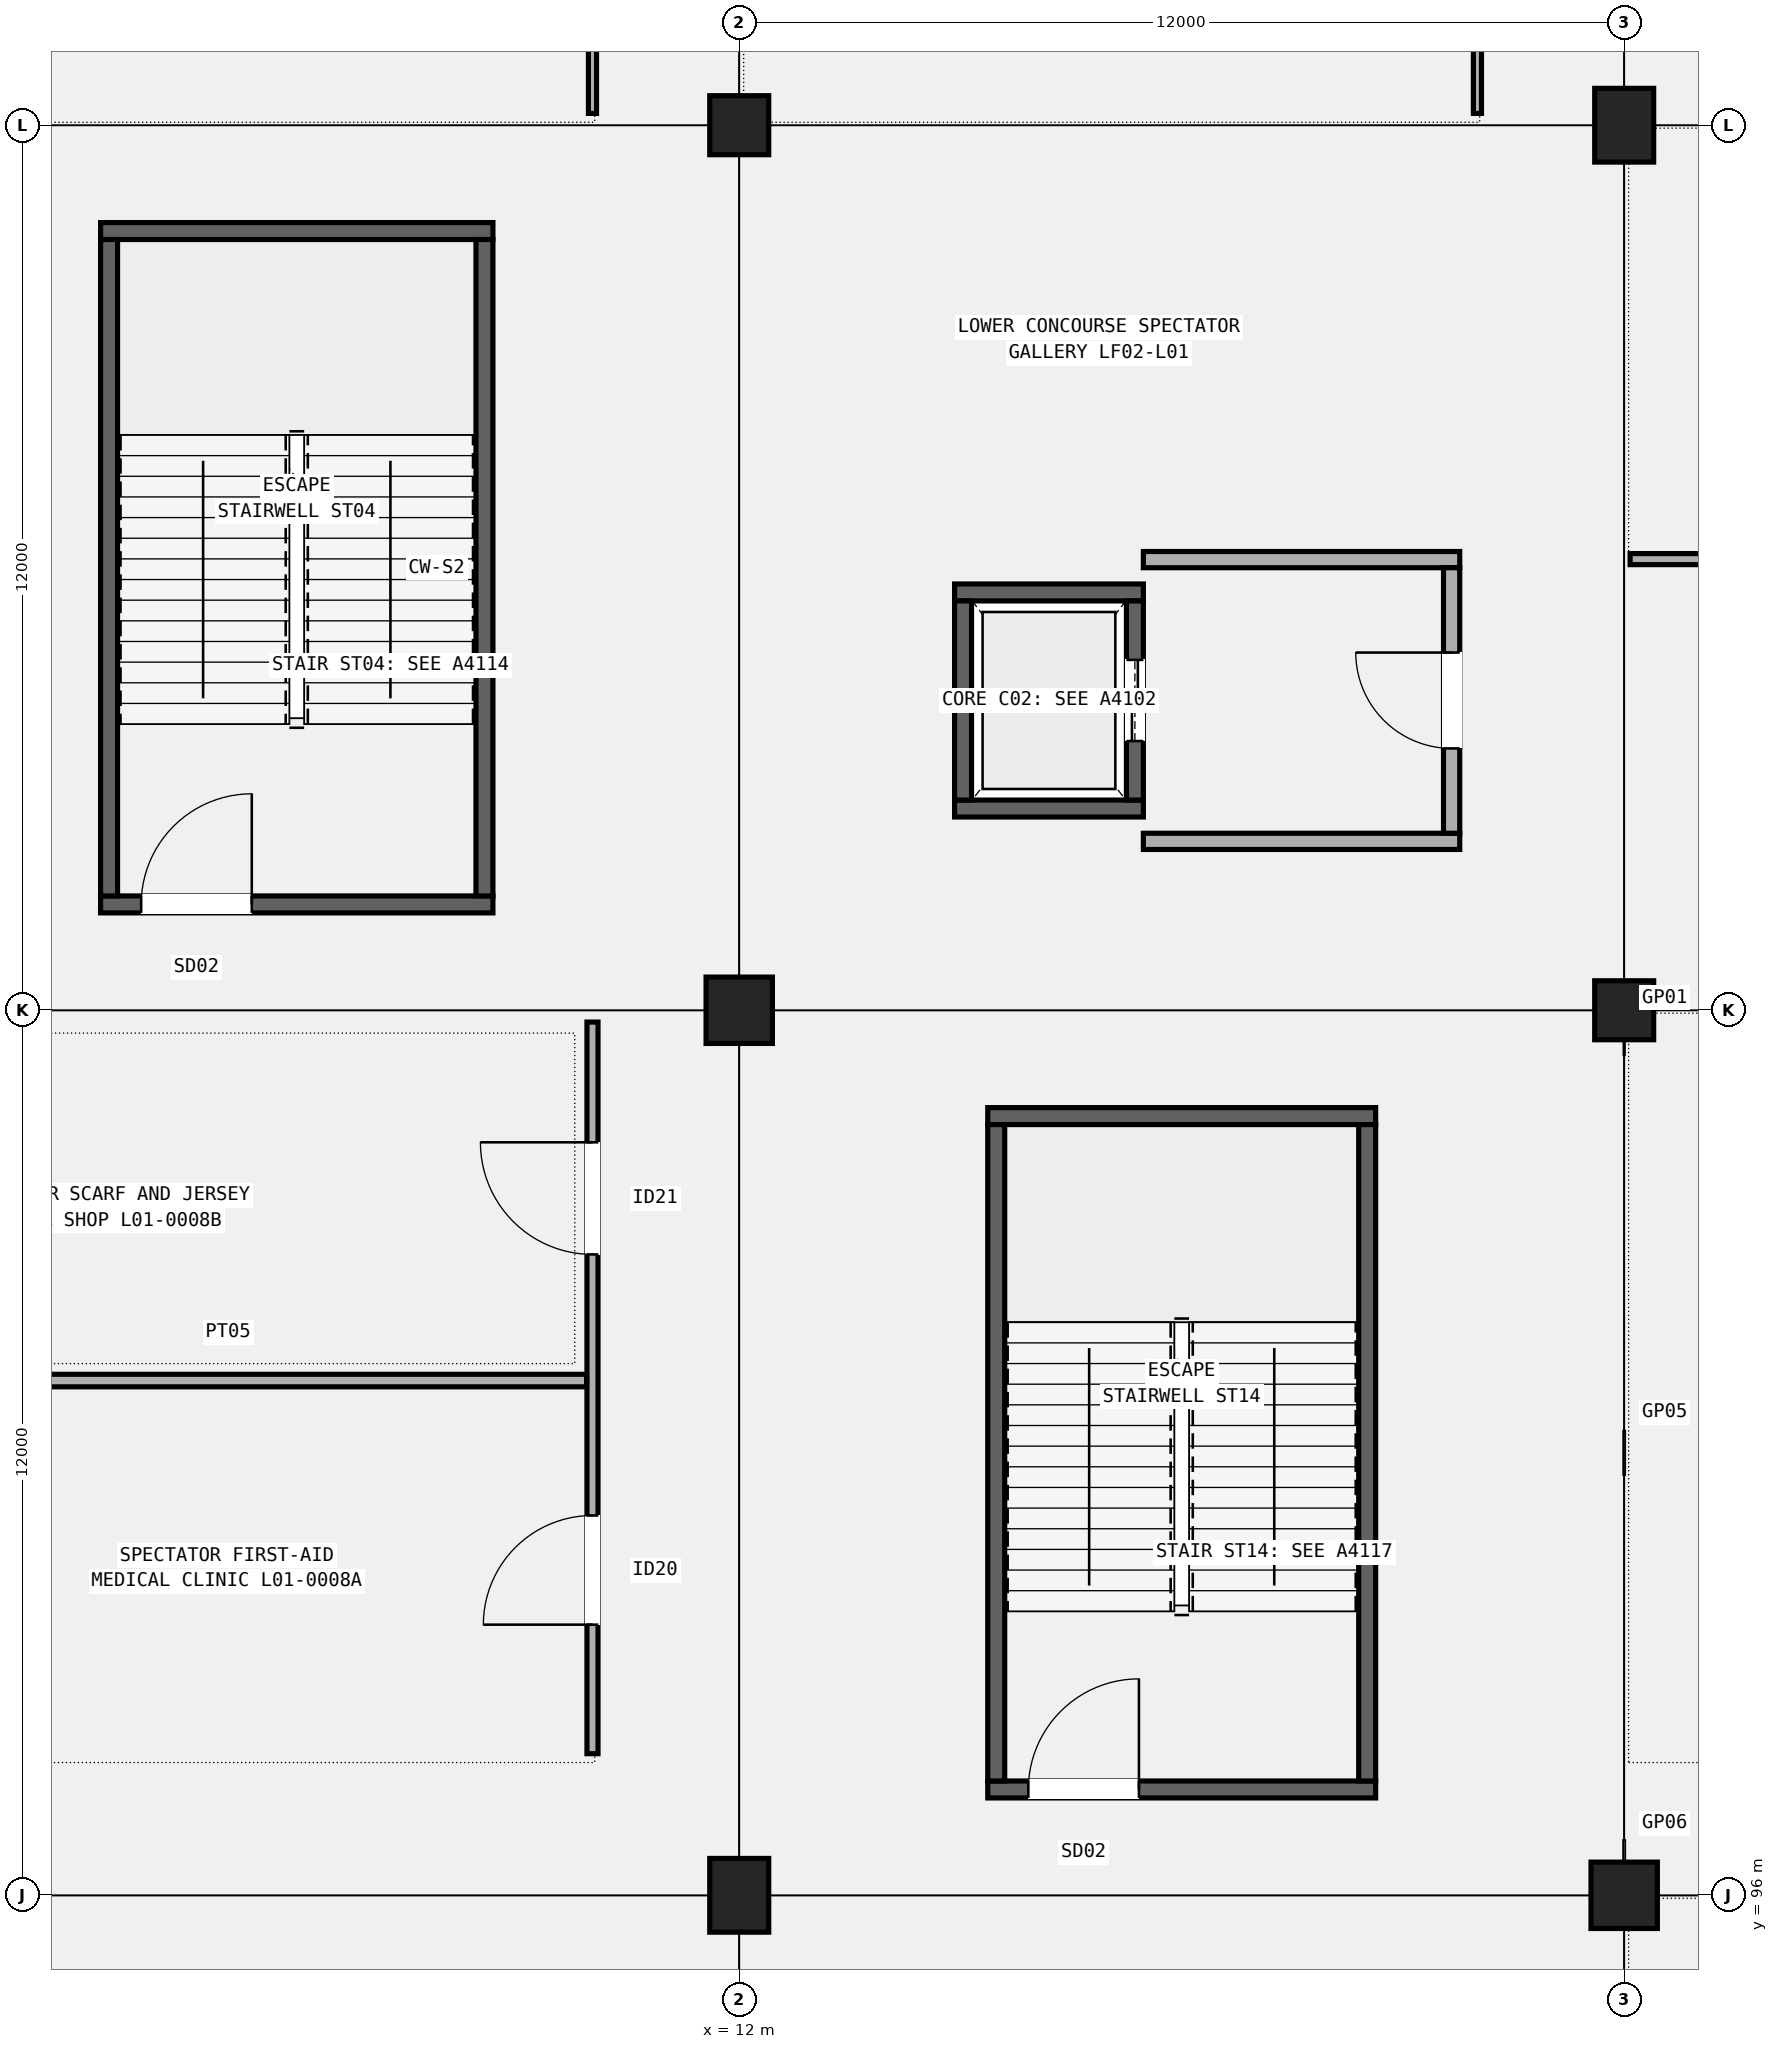
"""IFC4 building model, lengths in metres.
Left out: names, types, materials, properties, quantities, classifications, styles, units other than length and angle.
Written with IfcOpenShell. Run it as: python <this file> out.ifc"""

import sys

from ifc_helpers import new_model, si_unit, direction, frame, frame_2d, origin, origin_2d, place, context, subcontext, project, spatial, rectangle, extrude, element, fill, save


model = new_model("IFC4")
c1 = context("Model", 3, precision=1e-05, world=origin(), true_north=direction((0.0, 1.0)))
c2 = subcontext(c1, "Body", "Model", "MODEL_VIEW")
j1 = project(units=[si_unit("LENGTHUNIT", "METRE"), si_unit("PLANEANGLEUNIT", "RADIAN")], contexts=[c1])
p1 = place(None, origin())
s1 = spatial("IfcSite", under=j1, at=p1, CompositionType="ELEMENT")
p2 = place(p1, origin())
s2 = spatial("IfcBuilding", under=s1, at=p2, CompositionType="ELEMENT")
p3 = place(p2, frame((0.0, 0.0, 5.4)))
s3 = spatial("IfcBuildingStorey", under=s2, at=p3, CompositionType="ELEMENT", Elevation=5.4)
p4 = place(p3, frame((12.0, 96.0, 0.0), z_axis=(0.0, 0.0, 1.0), x_axis=(1.0, 0.0, 0.0)))
e1 = element("IfcColumn", 1, at=p4, inside=s3, PredefinedType="COLUMN", context=c2, shape_type="SweptSolid", body=[
    extrude(rectangle(XDim=0.8, YDim=1.0, at=origin_2d()), origin(), (0.0, 0.0, 1.0), 4.8),
])
p5 = place(p3, frame((12.0, 108.0, 0.0), z_axis=(0.0, 0.0, 1.0), x_axis=(1.0, 0.0, 0.0)))
e2 = element("IfcColumn", 2, at=p5, inside=s3, PredefinedType="COLUMN", context=c2, shape_type="SweptSolid", body=[
    extrude(rectangle(XDim=0.9, YDim=0.9, at=origin_2d()), origin(), (0.0, 0.0, 1.0), 4.8),
])
p6 = place(p3, frame((12.0, 120.0, 0.0), z_axis=(0.0, 0.0, 1.0), x_axis=(1.0, 0.0, 0.0)))
e3 = element("IfcColumn", 3, at=p6, inside=s3, PredefinedType="COLUMN", context=c2, shape_type="SweptSolid", body=[
    extrude(rectangle(XDim=0.8, YDim=0.8, at=origin_2d()), origin(), (0.0, 0.0, 1.0), 4.8),
])
p7 = place(p3, frame((24.0, 96.0, 0.0), z_axis=(0.0, 0.0, 1.0), x_axis=(1.0, 0.0, 0.0)))
e4 = element("IfcColumn", 4, at=p7, inside=s3, PredefinedType="COLUMN", context=c2, shape_type="SweptSolid", body=[
    extrude(rectangle(XDim=0.9, YDim=0.9, at=origin_2d()), origin(), (0.0, 0.0, 1.0), 4.8),
])
p8 = place(p3, frame((24.0, 108.0, 0.0), z_axis=(0.0, 0.0, 1.0), x_axis=(1.0, 0.0, 0.0)))
e5 = element("IfcColumn", 5, at=p8, inside=s3, PredefinedType="COLUMN", context=c2, shape_type="SweptSolid", body=[
    extrude(rectangle(XDim=0.8, YDim=0.8, at=origin_2d()), origin(), (0.0, 0.0, 1.0), 4.8),
])
p9 = place(p3, frame((24.0, 120.0, 0.0), z_axis=(0.0, 0.0, 1.0), x_axis=(1.0, 0.0, 0.0)))
e6 = element("IfcColumn", 6, at=p9, inside=s3, PredefinedType="COLUMN", context=c2, shape_type="SweptSolid", body=[
    extrude(rectangle(XDim=0.8, YDim=1.0, at=origin_2d()), origin(), (0.0, 0.0, 1.0), 4.8),
])
p10 = place(p3, frame((3.34, 109.435, 0.0), z_axis=(0.0, 0.0, 1.0), x_axis=(1.0, 0.0, 0.0)))
e7 = element("IfcWall", 7, at=p10, inside=s3, PredefinedType="SHEAR", context=c2, shape_type="SweptSolid", body=[
    extrude(rectangle(XDim=5.32, YDim=0.23, at=frame_2d((2.66, 0.0))), origin(), (0.0, 0.0, 1.0), 4.55),
])
p11 = place(p10, frame((0.55, 0.0, 0.0)))
e8 = element("IfcOpeningElement", 8, at=p11, cuts=e7, PredefinedType="OPENING", context=c2, shape_type="SweptSolid", body=[
    extrude(rectangle(XDim=1.5, YDim=2.2, at=frame_2d((0.75, 1.1))), frame((0.0, 0.125, 0.0), z_axis=(0.0, -1.0, 0.0), x_axis=(1.0, 0.0, 0.0)), (0.0, 0.0, 1.0), 0.25),
])
p12 = place(p3, frame((3.34, 118.565, 0.0), z_axis=(0.0, 0.0, 1.0), x_axis=(1.0, 0.0, 0.0)))
e9 = element("IfcWall", 9, at=p12, inside=s3, PredefinedType="SHEAR", context=c2, shape_type="SweptSolid", body=[
    extrude(rectangle(XDim=5.32, YDim=0.23, at=frame_2d((2.66, 0.0))), origin(), (0.0, 0.0, 1.0), 4.55),
])
for number, where, z_axis, x_axis in (
    (10, (3.455, 109.55, 0.0), (0.0, 0.0, 1.0), (0.0, 1.0, 0.0)),
    (11, (8.545, 109.55, 0.0), (0.0, 0.0, 1.0), (0.0, 1.0, 0.0)),
):
    element("IfcWall", number, at=place(p3, frame(where, z_axis=z_axis, x_axis=x_axis)), inside=s3, PredefinedType="SHEAR", context=c2, shape_type="SweptSolid", body=[
        extrude(rectangle(XDim=8.9, YDim=0.23, at=frame_2d((4.45, 0.0))), origin(), (0.0, 0.0, 1.0), 4.55),
    ])
p13 = place(p3, frame((15.37, 97.435, 0.0), z_axis=(0.0, 0.0, 1.0), x_axis=(1.0, 0.0, 0.0)))
e12 = element("IfcWall", 12, at=p13, inside=s3, PredefinedType="SHEAR", context=c2, shape_type="SweptSolid", body=[
    extrude(rectangle(XDim=5.26, YDim=0.23, at=frame_2d((2.63, 0.0))), origin(), (0.0, 0.0, 1.0), 4.55),
])
p14 = place(p13, frame((0.55, 0.0, 0.0)))
e13 = element("IfcOpeningElement", 13, at=p14, cuts=e12, PredefinedType="OPENING", context=c2, shape_type="SweptSolid", body=[
    extrude(rectangle(XDim=1.5, YDim=2.2, at=frame_2d((0.75, 1.1))), frame((0.0, 0.125, 0.0), z_axis=(0.0, -1.0, 0.0), x_axis=(1.0, 0.0, 0.0)), (0.0, 0.0, 1.0), 0.25),
])
p15 = place(p3, frame((15.37, 106.565, 0.0), z_axis=(0.0, 0.0, 1.0), x_axis=(1.0, 0.0, 0.0)))
e14 = element("IfcWall", 14, at=p15, inside=s3, PredefinedType="SHEAR", context=c2, shape_type="SweptSolid", body=[
    extrude(rectangle(XDim=5.26, YDim=0.23, at=frame_2d((2.63, 0.0))), origin(), (0.0, 0.0, 1.0), 4.55),
])
for number, where, z_axis, x_axis in (
    (15, (15.485, 97.55, 0.0), (0.0, 0.0, 1.0), (0.0, 1.0, 0.0)),
    (16, (20.515, 97.55, 0.0), (0.0, 0.0, 1.0), (0.0, 1.0, 0.0)),
):
    element("IfcWall", number, at=place(p3, frame(where, z_axis=z_axis, x_axis=x_axis)), inside=s3, PredefinedType="SHEAR", context=c2, shape_type="SweptSolid", body=[
        extrude(rectangle(XDim=8.9, YDim=0.23, at=frame_2d((4.45, 0.0))), origin(), (0.0, 0.0, 1.0), 4.55),
    ])
for number, where, z_axis, x_axis in (
    (17, (14.92, 110.735, 0.0), (0.0, 0.0, 1.0), (1.0, 0.0, 0.0)),
    (18, (14.92, 113.665, 0.0), (0.0, 0.0, 1.0), (1.0, 0.0, 0.0)),
):
    element("IfcWall", number, at=place(p3, frame(where, z_axis=z_axis, x_axis=x_axis)), inside=s3, PredefinedType="SHEAR", context=c2, shape_type="SweptSolid", body=[
        extrude(rectangle(XDim=2.56, YDim=0.23, at=frame_2d((1.28, 0.0))), origin(), (0.0, 0.0, 1.0), 4.55),
    ])
p16 = place(p3, frame((15.035, 110.85, 0.0), z_axis=(0.0, 0.0, 1.0), x_axis=(0.0, 1.0, 0.0)))
e19 = element("IfcWall", 19, at=p16, inside=s3, PredefinedType="SHEAR", context=c2, shape_type="SweptSolid", body=[
    extrude(rectangle(XDim=2.7, YDim=0.23, at=frame_2d((1.35, 0.0))), origin(), (0.0, 0.0, 1.0), 4.55),
])
p17 = place(p3, frame((17.365, 110.85, 0.0), z_axis=(0.0, 0.0, 1.0), x_axis=(0.0, 1.0, 0.0)))
e20 = element("IfcWall", 20, at=p17, inside=s3, PredefinedType="SHEAR", context=c2, shape_type="SweptSolid", body=[
    extrude(rectangle(XDim=2.7, YDim=0.23, at=frame_2d((1.35, 0.0))), origin(), (0.0, 0.0, 1.0), 4.55),
])
p18 = place(p17, frame((0.8, 0.0, 0.0)))
e21 = element("IfcOpeningElement", 21, at=p18, cuts=e20, PredefinedType="OPENING", context=c2, shape_type="SweptSolid", body=[
    extrude(rectangle(XDim=1.1, YDim=2.15, at=frame_2d((0.55, 1.075))), frame((0.0, 0.125, 0.0), z_axis=(0.0, -1.0, 0.0), x_axis=(1.0, 0.0, 0.0)), (0.0, 0.0, 1.0), 0.25),
])
for number, where, z_axis, x_axis in (
    (22, (17.48, 110.29, 0.0), (0.0, 0.0, 1.0), (1.0, 0.0, 0.0)),
    (23, (17.48, 114.11, 0.0), (0.0, 0.0, 1.0), (1.0, 0.0, 0.0)),
):
    element("IfcWall", number, at=place(p3, frame(where, z_axis=z_axis, x_axis=x_axis)), inside=s3, PredefinedType="SOLIDWALL", context=c2, shape_type="SweptSolid", body=[
        extrude(rectangle(XDim=4.29, YDim=0.22, at=frame_2d((2.145, 0.0))), origin(), (0.0, 0.0, 1.0), 3.92),
    ])
p19 = place(p3, frame((21.66, 110.4, 0.0), z_axis=(0.0, 0.0, 1.0), x_axis=(0.0, 1.0, 0.0)))
e24 = element("IfcWall", 24, at=p19, inside=s3, PredefinedType="SOLIDWALL", context=c2, shape_type="SweptSolid", body=[
    extrude(rectangle(XDim=3.6, YDim=0.22, at=frame_2d((1.8, 0.0))), origin(), (0.0, 0.0, 1.0), 3.92),
])
p20 = place(p19, frame((1.15, 0.0, 0.0)))
e25 = element("IfcOpeningElement", 25, at=p20, cuts=e24, PredefinedType="OPENING", context=c2, shape_type="SweptSolid", body=[
    extrude(rectangle(XDim=1.3, YDim=2.15, at=frame_2d((0.65, 1.075))), frame((0.0, 0.12, 0.0), z_axis=(0.0, -1.0, 0.0), x_axis=(1.0, 0.0, 0.0)), (0.0, 0.0, 1.0), 0.24),
])
p21 = place(p3, frame((10.01, 97.92, 0.0), z_axis=(0.0, 0.0, 1.0), x_axis=(0.0, 1.0, 0.0)))
e26 = element("IfcWall", 26, at=p21, inside=s3, PredefinedType="PARTITIONING", context=c2, shape_type="SweptSolid", body=[
    extrude(rectangle(XDim=9.92, YDim=0.15, at=frame_2d((4.96, 0.0))), origin(), (0.0, 0.0, 1.0), 3.92),
])
p22 = place(p21, frame((1.75, 0.0, 0.0)))
e27 = element("IfcOpeningElement", 27, at=p22, cuts=e26, PredefinedType="OPENING", context=c2, shape_type="SweptSolid", body=[
    extrude(rectangle(XDim=1.48, YDim=2.24, at=frame_2d((0.74, 1.12))), frame((0.0, 0.085, 0.0), z_axis=(0.0, -1.0, 0.0), x_axis=(1.0, 0.0, 0.0)), (0.0, 0.0, 1.0), 0.17),
])
p23 = place(p21, frame((6.77, 0.0, 0.0)))
e28 = element("IfcOpeningElement", 28, at=p23, cuts=e26, PredefinedType="OPENING", context=c2, shape_type="SweptSolid", body=[
    extrude(rectangle(XDim=1.52, YDim=2.28, at=frame_2d((0.76, 1.14))), frame((0.0, 0.085, 0.0), z_axis=(0.0, -1.0, 0.0), x_axis=(1.0, 0.0, 0.0)), (0.0, 0.0, 1.0), 0.17),
])
p24 = place(p3, frame((0.207, 102.979, 0.0), z_axis=(0.0, 0.0, 1.0), x_axis=(1.0, 0.0, 0.0)))
e29 = element("IfcWall", 29, at=p24, inside=s3, PredefinedType="PARTITIONING", context=c2, shape_type="SweptSolid", body=[
    extrude(rectangle(XDim=9.723, YDim=0.17, at=frame_2d((4.861, 0.0))), origin(), (0.0, 0.0, 1.0), 3.92),
])
p25 = place(p3, frame((10.01, 120.16, 0.0), z_axis=(0.0, 0.0, 1.0), x_axis=(0.0, 1.0, 0.0)))
e30 = element("IfcWall", 30, at=p25, inside=s3, PredefinedType="PARTITIONING", context=c2, shape_type="SweptSolid", body=[
    extrude(rectangle(XDim=11.68, YDim=0.11, at=frame_2d((5.84, 0.0))), origin(), (0.0, 0.0, 1.0), 3.92),
])
p26 = place(p25, frame((5.06, 0.0, 0.0)))
e31 = element("IfcOpeningElement", 31, at=p26, cuts=e30, PredefinedType="OPENING", context=c2, shape_type="SweptSolid", body=[
    extrude(rectangle(XDim=1.56, YDim=2.26, at=frame_2d((0.78, 1.13))), frame((0.0, 0.065, 0.0), z_axis=(0.0, -1.0, 0.0), x_axis=(1.0, 0.0, 0.0)), (0.0, 0.0, 1.0), 0.13),
])
p27 = place(p3, frame((22.01, 120.16, 0.0), z_axis=(0.0, 0.0, 1.0), x_axis=(0.0, 1.0, 0.0)))
e32 = element("IfcWall", 32, at=p27, inside=s3, PredefinedType="PARTITIONING", context=c2, shape_type="SweptSolid", body=[
    extrude(rectangle(XDim=11.68, YDim=0.11, at=frame_2d((5.84, 0.0))), origin(), (0.0, 0.0, 1.0), 3.92),
])
p28 = place(p27, frame((2.088, 0.0, 0.0)))
e33 = element("IfcOpeningElement", 33, at=p28, cuts=e32, PredefinedType="OPENING", context=c2, shape_type="SweptSolid", body=[
    extrude(rectangle(XDim=1.7, YDim=2.32, at=frame_2d((0.85, 1.16))), frame((0.0, 0.065, 0.0), z_axis=(0.0, -1.0, 0.0), x_axis=(1.0, 0.0, 0.0)), (0.0, 0.0, 1.0), 0.13),
])
p29 = place(p27, frame((7.979, 0.0, 0.0)))
e34 = element("IfcOpeningElement", 34, at=p29, cuts=e32, PredefinedType="OPENING", context=c2, shape_type="SweptSolid", body=[
    extrude(rectangle(XDim=1.76, YDim=2.3, at=frame_2d((0.88, 1.15))), frame((0.0, 0.065, 0.0), z_axis=(0.0, -1.0, 0.0), x_axis=(1.0, 0.0, 0.0)), (0.0, 0.0, 1.0), 0.13),
])
p30 = place(p3, frame((24.08, 114.117, 0.0), z_axis=(0.0, 0.0, 1.0), x_axis=(1.0, 0.0, 0.0)))
e35 = element("IfcWall", 35, at=p30, inside=s3, PredefinedType="PARTITIONING", context=c2, shape_type="SweptSolid", body=[
    extrude(rectangle(XDim=10.355, YDim=0.15, at=frame_2d((5.177, 0.0))), origin(), (0.0, 0.0, 1.0), 3.92),
])
p31 = place(p11, origin())
e36 = element("IfcDoor", 36, at=p31, inside=s3, OperationType="SINGLE_SWING_RIGHT", PredefinedType="DOOR", context=c2, shape_type="SweptSolid", body=[
    extrude(rectangle(XDim=1.5, YDim=2.2, at=frame_2d((0.75, 1.1))), frame((0.0, 0.025, 0.0), z_axis=(0.0, -1.0, 0.0), x_axis=(1.0, 0.0, 0.0)), (0.0, 0.0, 1.0), 0.05),
])
fill(e8, e36)
p32 = place(p14, origin())
e37 = element("IfcDoor", 37, at=p32, inside=s3, OperationType="SINGLE_SWING_RIGHT", PredefinedType="DOOR", context=c2, shape_type="SweptSolid", body=[
    extrude(rectangle(XDim=1.5, YDim=2.2, at=frame_2d((0.75, 1.1))), frame((0.0, 0.025, 0.0), z_axis=(0.0, -1.0, 0.0), x_axis=(1.0, 0.0, 0.0)), (0.0, 0.0, 1.0), 0.05),
])
fill(e13, e37)
p33 = place(p18, origin())
e38 = element("IfcDoor", 38, at=p33, inside=s3, OperationType="DOUBLE_DOOR_SLIDING", PredefinedType="DOOR", context=c2, shape_type="SweptSolid", body=[
    extrude(rectangle(XDim=1.1, YDim=2.15, at=frame_2d((0.55, 1.075))), frame((0.0, 0.025, 0.0), z_axis=(0.0, -1.0, 0.0), x_axis=(1.0, 0.0, 0.0)), (0.0, 0.0, 1.0), 0.05),
])
fill(e21, e38)
p34 = place(p20, origin())
e39 = element("IfcDoor", 39, at=p34, inside=s3, OperationType="SINGLE_SWING_RIGHT", PredefinedType="DOOR", context=c2, shape_type="SweptSolid", body=[
    extrude(rectangle(XDim=1.3, YDim=2.15, at=frame_2d((0.65, 1.075))), frame((0.0, 0.025, 0.0), z_axis=(0.0, -1.0, 0.0), x_axis=(1.0, 0.0, 0.0)), (0.0, 0.0, 1.0), 0.05),
])
fill(e25, e39)
p35 = place(p22, origin())
e40 = element("IfcDoor", 40, at=p35, inside=s3, OperationType="SINGLE_SWING_LEFT", PredefinedType="DOOR", context=c2, shape_type="SweptSolid", body=[
    extrude(rectangle(XDim=1.48, YDim=2.24, at=frame_2d((0.74, 1.12))), frame((0.0, 0.025, 0.0), z_axis=(0.0, -1.0, 0.0), x_axis=(1.0, 0.0, 0.0)), (0.0, 0.0, 1.0), 0.05),
])
fill(e27, e40)
p36 = place(p23, origin())
e41 = element("IfcDoor", 41, at=p36, inside=s3, OperationType="SINGLE_SWING_RIGHT", PredefinedType="DOOR", context=c2, shape_type="SweptSolid", body=[
    extrude(rectangle(XDim=1.52, YDim=2.28, at=frame_2d((0.76, 1.14))), frame((0.0, 0.025, 0.0), z_axis=(0.0, -1.0, 0.0), x_axis=(1.0, 0.0, 0.0)), (0.0, 0.0, 1.0), 0.05),
])
fill(e28, e41)
save(model, sys.argv[1])
